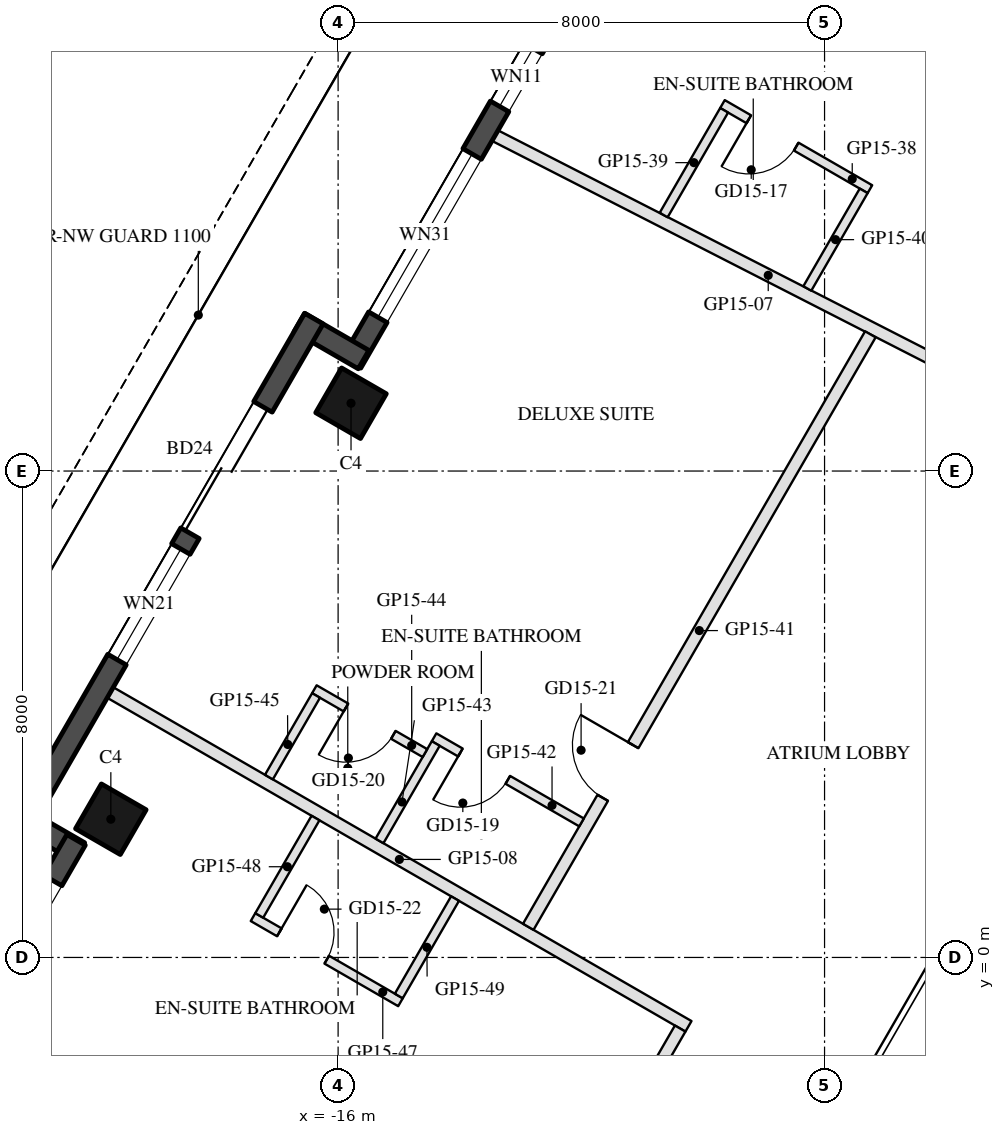
"""IFC4 building model, lengths in metres.
Left out: names, types, materials, properties, quantities, classifications, styles, units other than length and angle.
Written with IfcOpenShell. Run it as: python <this file> out.ifc"""

import sys

from ifc_helpers import new_model, si_unit, direction, frame, frame_2d, origin, origin_2d, place, context, subcontext, project, spatial, rectangle, hollow_rectangle, extrude, element, fill, save


model = new_model("IFC4")
c1 = context("Model", 3, precision=1e-05, world=origin(), true_north=direction((0.0, 1.0)))
c2 = subcontext(c1, "Body", "Model", "MODEL_VIEW")
j1 = project(units=[si_unit("LENGTHUNIT", "METRE"), si_unit("PLANEANGLEUNIT", "RADIAN")], contexts=[c1])
p1 = place(None, origin())
s1 = spatial("IfcSite", under=j1, at=p1, CompositionType="ELEMENT")
p2 = place(p1, origin())
s2 = spatial("IfcBuilding", under=s1, at=p2, CompositionType="ELEMENT")
p3 = place(p2, frame((0.0, 0.0, 172.5)))
s3 = spatial("IfcBuildingStorey", under=s2, at=p3, CompositionType="ELEMENT", Elevation=172.5)
for number, where, z_axis, x_axis in (
    (1, (-15.788, 9.115, 0.0), (0.0, 0.0, 1.0), (0.5, 0.866, 0.0)),
    (2, (-19.738, 2.273, 0.0), (0.0, 0.0, 1.0), (0.5, 0.866, 0.0)),
):
    element("IfcColumn", number, at=place(p3, frame(where, z_axis=z_axis, x_axis=x_axis)), inside=s3, PredefinedType="COLUMN", context=c2, shape_type="SweptSolid", body=[
        extrude(hollow_rectangle(XDim=0.85, YDim=0.85, WallThickness=0.04, at=origin_2d()), origin(), (0.0, 0.0, 1.0), 3.7),
    ])
p4 = place(p3, frame((-12.409, 15.617, 0.0), z_axis=(0.0, 0.0, 1.0), x_axis=(-0.500003597184, -0.866023326939, 0.0)))
e3 = element("IfcWall", 3, at=p4, inside=s3, PredefinedType="SOLIDWALL", context=c2, shape_type="SweptSolid", body=[
    extrude(rectangle(XDim=6.74, YDim=0.35, at=frame_2d((3.37, 0.0))), origin(), (0.0, 0.0, 1.0), 3.55),
])
p5 = place(p4, frame((0.77, 0.0, 0.3)))
e4 = element("IfcOpeningElement", 4, at=p5, cuts=e3, PredefinedType="OPENING", context=c2, shape_type="SweptSolid", body=[
    extrude(rectangle(XDim=1.1, YDim=2.65, at=frame_2d((0.55, 1.325))), frame((0.0, 0.185, 0.0), z_axis=(0.0, -1.0, 0.0), x_axis=(1.0, 0.0, 0.0)), (0.0, 0.0, 1.0), 0.37),
])
p6 = place(p4, frame((2.774, 0.0, 0.3)))
e5 = element("IfcOpeningElement", 5, at=p6, cuts=e3, PredefinedType="OPENING", context=c2, shape_type="SweptSolid", body=[
    extrude(rectangle(XDim=3.1, YDim=2.65, at=frame_2d((1.55, 1.325))), frame((0.0, 0.185, 0.0), z_axis=(0.0, -1.0, 0.0), x_axis=(1.0, 0.0, 0.0)), (0.0, 0.0, 1.0), 0.37),
])
p7 = place(p3, frame((-15.581, 9.833, 0.0), z_axis=(0.0, 0.0, 1.0), x_axis=(-0.866055662726, 0.499947586314, 0.0)))
e6 = element("IfcWall", 6, at=p7, inside=s3, PredefinedType="SOLIDWALL", context=c2, shape_type="SweptSolid", body=[
    extrude(rectangle(XDim=1.22, YDim=0.35, at=frame_2d((0.61, 0.0))), origin(), (0.0, 0.0, 1.0), 3.55),
])
p8 = place(p3, frame((-16.398, 10.507, 0.0), z_axis=(0.0, 0.0, 1.0), x_axis=(-0.499999142773, -0.866025898704, 0.0)))
e7 = element("IfcWall", 7, at=p8, inside=s3, PredefinedType="SOLIDWALL", context=c2, shape_type="SweptSolid", body=[
    extrude(rectangle(XDim=9.7, YDim=0.35, at=frame_2d((4.85, 0.0))), origin(), (0.0, 0.0, 1.0), 3.55),
])
p9 = place(p8, frame((1.675, 0.0, 0.0)))
e8 = element("IfcOpeningElement", 8, at=p9, cuts=e7, PredefinedType="OPENING", context=c2, shape_type="SweptSolid", body=[
    extrude(rectangle(XDim=2.4, YDim=2.4, at=frame_2d((1.2, 1.2))), frame((0.0, 0.185, 0.0), z_axis=(0.0, -1.0, 0.0), x_axis=(1.0, 0.0, 0.0)), (0.0, 0.0, 1.0), 0.37),
])
p10 = place(p8, frame((4.375, 0.0, 0.3)))
e9 = element("IfcOpeningElement", 9, at=p10, cuts=e7, PredefinedType="OPENING", context=c2, shape_type="SweptSolid", body=[
    extrude(rectangle(XDim=2.1, YDim=2.65, at=frame_2d((1.05, 1.325))), frame((0.0, 0.185, 0.0), z_axis=(0.0, -1.0, 0.0), x_axis=(1.0, 0.0, 0.0)), (0.0, 0.0, 1.0), 0.37),
])
p11 = place(p3, frame((-21.312, 2.346, 0.0), z_axis=(0.0, 0.0, 1.0), x_axis=(0.866005645448, -0.500034220881, 0.0)))
e10 = element("IfcWall", 10, at=p11, inside=s3, PredefinedType="SOLIDWALL", context=c2, shape_type="SweptSolid", body=[
    extrude(rectangle(XDim=1.22, YDim=0.35, at=frame_2d((0.61, 0.0))), origin(), (0.0, 0.0, 1.0), 3.55),
])
p12 = place(p3, frame((-20.309, 1.934, 0.0), z_axis=(0.0, 0.0, 1.0), x_axis=(-0.499992114976, -0.866029956157, 0.0)))
e11 = element("IfcWall", 11, at=p12, inside=s3, PredefinedType="SOLIDWALL", context=c2, shape_type="SweptSolid", body=[
    extrude(rectangle(XDim=6.74, YDim=0.35, at=frame_2d((3.37, 0.0))), origin(), (0.0, 0.0, 1.0), 3.55),
])
p13 = place(p12, frame((4.02, 0.0, 0.0)))
e12 = element("IfcOpeningElement", 12, at=p13, cuts=e11, PredefinedType="OPENING", context=c2, shape_type="SweptSolid", body=[
    extrude(rectangle(XDim=2.4, YDim=2.4, at=frame_2d((1.2, 1.2))), frame((0.0, 0.185, 0.0), z_axis=(0.0, -1.0, 0.0), x_axis=(1.0, 0.0, 0.0)), (0.0, 0.0, 1.0), 0.37),
])
p14 = place(p12, frame((0.77, 0.0, 0.3)))
e13 = element("IfcOpeningElement", 13, at=p14, cuts=e11, PredefinedType="OPENING", context=c2, shape_type="SweptSolid", body=[
    extrude(rectangle(XDim=2.9, YDim=2.65, at=frame_2d((1.45, 1.325))), frame((0.0, 0.185, 0.0), z_axis=(0.0, -1.0, 0.0), x_axis=(1.0, 0.0, 0.0)), (0.0, 0.0, 1.0), 0.37),
])
p15 = place(p3, frame((-13.42, 13.517, 0.0), z_axis=(0.0, 0.0, 1.0), x_axis=(0.890385665103, -0.455206950056, 0.0)))
e14 = element("IfcWall", 14, at=p15, inside=s3, PredefinedType="PARTITIONING", context=c2, shape_type="SweptSolid", body=[
    extrude(rectangle(XDim=10.093, YDim=0.2, at=frame_2d((5.047, 0.0))), origin(), (0.0, 0.0, 1.0), 3.06),
])
p16 = place(p3, frame((-19.747, 4.357, 0.0), z_axis=(0.0, 0.0, 1.0), x_axis=(0.866027479907, -0.499996404033, 0.0)))
e15 = element("IfcWall", 15, at=p16, inside=s3, PredefinedType="PARTITIONING", context=c2, shape_type="SweptSolid", body=[
    extrude(rectangle(XDim=10.98, YDim=0.2, at=frame_2d((5.49, 0.0))), origin(), (0.0, 0.0, 1.0), 3.06),
])
p17 = place(p3, frame((-7.254, 12.636, 0.0), z_axis=(0.0, 0.0, 1.0), x_axis=(-0.865996816683, 0.500049511043, 0.0)))
e16 = element("IfcWall", 16, at=p17, inside=s3, PredefinedType="PARTITIONING", context=c2, shape_type="SweptSolid", body=[
    extrude(rectangle(XDim=2.8, YDim=0.15, at=frame_2d((1.4, 0.0))), origin(), (0.0, 0.0, 1.0), 3.55),
])
p18 = place(p17, frame((1.4, 0.0, 0.0)))
e17 = element("IfcOpeningElement", 17, at=p18, cuts=e16, PredefinedType="OPENING", context=c2, shape_type="SweptSolid", body=[
    extrude(rectangle(XDim=0.9, YDim=2.1, at=frame_2d((0.45, 1.05))), frame((0.0, 0.085, 0.0), z_axis=(0.0, -1.0, 0.0), x_axis=(1.0, 0.0, 0.0)), (0.0, 0.0, 1.0), 0.17),
])
p19 = place(p3, frame((-9.651, 13.933, 0.0), z_axis=(0.0, 0.0, 1.0), x_axis=(-0.50001992892, -0.866013897511, 0.0)))
e18 = element("IfcWall", 18, at=p19, inside=s3, PredefinedType="PARTITIONING", context=c2, shape_type="SweptSolid", body=[
    extrude(rectangle(XDim=1.989, YDim=0.15, at=frame_2d((0.995, 0.0))), origin(), (0.0, 0.0, 1.0), 3.55),
])
p20 = place(p3, frame((-7.356, 12.608, 0.0), z_axis=(0.0, 0.0, 1.0), x_axis=(-0.499935264145, -0.866062775822, 0.0)))
e19 = element("IfcWall", 19, at=p20, inside=s3, PredefinedType="PARTITIONING", context=c2, shape_type="SweptSolid", body=[
    extrude(rectangle(XDim=1.854, YDim=0.15, at=frame_2d((0.927, 0.0))), origin(), (0.0, 0.0, 1.0), 3.55),
])
p21 = place(p3, frame((-12.873, 0.504, 0.0), z_axis=(0.0, 0.0, 1.0), x_axis=(0.500019832059, 0.866013953437, 0.0)))
e20 = element("IfcWall", 20, at=p21, inside=s3, PredefinedType="PARTITIONING", context=c2, shape_type="SweptSolid", body=[
    extrude(rectangle(XDim=11.252, YDim=0.2, at=frame_2d((5.626, 0.0))), origin(), (0.0, 0.0, 1.0), 2.95),
])
p22 = place(p21, frame((2.45, 0.0, 0.0)))
e21 = element("IfcOpeningElement", 21, at=p22, cuts=e20, PredefinedType="OPENING", context=c2, shape_type="SweptSolid", body=[
    extrude(rectangle(XDim=1.0, YDim=2.1, at=frame_2d((0.5, 1.05))), frame((0.0, 0.11, 0.0), z_axis=(0.0, -1.0, 0.0), x_axis=(1.0, 0.0, 0.0)), (0.0, 0.0, 1.0), 0.22),
])
p23 = place(p3, frame((-11.997, 2.221, 0.0), z_axis=(0.0, 0.0, 1.0), x_axis=(-0.866034573852, 0.49998411664, 0.0)))
e22 = element("IfcWall", 22, at=p23, inside=s3, PredefinedType="PARTITIONING", context=c2, shape_type="SweptSolid", body=[
    extrude(rectangle(XDim=2.8, YDim=0.15, at=frame_2d((1.4, 0.0))), origin(), (0.0, 0.0, 1.0), 2.95),
])
p24 = place(p23, frame((1.4, 0.0, 0.0)))
e23 = element("IfcOpeningElement", 23, at=p24, cuts=e22, PredefinedType="OPENING", context=c2, shape_type="SweptSolid", body=[
    extrude(rectangle(XDim=0.9, YDim=2.1, at=frame_2d((0.45, 1.05))), frame((0.0, 0.085, 0.0), z_axis=(0.0, -1.0, 0.0), x_axis=(1.0, 0.0, 0.0)), (0.0, 0.0, 1.0), 0.17),
])
p25 = place(p3, frame((-14.394, 3.519, 0.0), z_axis=(0.0, 0.0, 1.0), x_axis=(-0.499886193382, -0.866091100096, 0.0)))
e24 = element("IfcWall", 24, at=p25, inside=s3, PredefinedType="PARTITIONING", context=c2, shape_type="SweptSolid", body=[
    extrude(rectangle(XDim=1.85, YDim=0.15, at=frame_2d((0.925, 0.0))), origin(), (0.0, 0.0, 1.0), 3.55),
])
p26 = place(p3, frame((-14.572, 3.361, 0.0), z_axis=(0.0, 0.0, 1.0), x_axis=(-0.866009402589, 0.500027713859, 0.0)))
e25 = element("IfcWall", 25, at=p26, inside=s3, PredefinedType="PARTITIONING", context=c2, shape_type="SweptSolid", body=[
    extrude(rectangle(XDim=2.1, YDim=0.15, at=frame_2d((1.05, 0.0))), origin(), (0.0, 0.0, 1.0), 3.55),
])
p27 = place(p26, frame((0.6, 0.0, 0.0)))
e26 = element("IfcOpeningElement", 26, at=p27, cuts=e25, PredefinedType="OPENING", context=c2, shape_type="SweptSolid", body=[
    extrude(rectangle(XDim=0.9, YDim=2.1, at=frame_2d((0.45, 1.05))), frame((0.0, 0.085, 0.0), z_axis=(0.0, -1.0, 0.0), x_axis=(1.0, 0.0, 0.0)), (0.0, 0.0, 1.0), 0.17),
])
p28 = place(p3, frame((-16.363, 4.309, 0.0), z_axis=(0.0, 0.0, 1.0), x_axis=(-0.500086022567, -0.865975732936, 0.0)))
e27 = element("IfcWall", 27, at=p28, inside=s3, PredefinedType="PARTITIONING", context=c2, shape_type="SweptSolid", body=[
    extrude(rectangle(XDim=1.55, YDim=0.15, at=frame_2d((0.775, 0.0))), origin(), (0.0, 0.0, 1.0), 3.55),
])
p29 = place(p3, frame((-12.269, -4.45, 0.0), z_axis=(0.0, 0.0, 1.0), x_axis=(0.500055316652, 0.865993464345, 0.0)))
e28 = element("IfcWall", 28, at=p29, inside=s3, PredefinedType="PARTITIONING", context=c2, shape_type="SweptSolid", body=[
    extrude(rectangle(XDim=3.788, YDim=0.2, at=frame_2d((1.894, 0.0))), origin(), (0.0, 0.0, 1.0), 2.95),
])
p30 = place(p29, frame((1.394, 0.0, 0.0)))
e29 = element("IfcOpeningElement", 29, at=p30, cuts=e28, PredefinedType="OPENING", context=c2, shape_type="SweptSolid", body=[
    extrude(rectangle(XDim=1.0, YDim=2.1, at=frame_2d((0.5, 1.05))), frame((0.0, 0.11, 0.0), z_axis=(0.0, -1.0, 0.0), x_axis=(1.0, 0.0, 0.0)), (0.0, 0.0, 1.0), 0.22),
])
p31 = place(p3, frame((-17.399, 0.664, 0.0), z_axis=(0.0, 0.0, 1.0), x_axis=(0.866018616679, -0.500011755427, 0.0)))
e30 = element("IfcWall", 30, at=p31, inside=s3, PredefinedType="PARTITIONING", context=c2, shape_type="SweptSolid", body=[
    extrude(rectangle(XDim=2.8, YDim=0.15, at=frame_2d((1.4, 0.0))), origin(), (0.0, 0.0, 1.0), 3.55),
])
p32 = place(p31, frame((0.5, 0.0, 0.0)))
e31 = element("IfcOpeningElement", 31, at=p32, cuts=e30, PredefinedType="OPENING", context=c2, shape_type="SweptSolid", body=[
    extrude(rectangle(XDim=0.9, YDim=2.1, at=frame_2d((0.45, 1.05))), frame((0.0, 0.085, 0.0), z_axis=(0.0, -1.0, 0.0), x_axis=(1.0, 0.0, 0.0)), (0.0, 0.0, 1.0), 0.17),
])
p33 = place(p3, frame((-16.372, 2.293, 0.0), z_axis=(0.0, 0.0, 1.0), x_axis=(-0.499985172903, -0.866033964044, 0.0)))
e32 = element("IfcWall", 32, at=p33, inside=s3, PredefinedType="PARTITIONING", context=c2, shape_type="SweptSolid", body=[
    extrude(rectangle(XDim=1.85, YDim=0.15, at=frame_2d((0.925, 0.0))), origin(), (0.0, 0.0, 1.0), 2.95),
])
p34 = place(p3, frame((-14.077, 0.968, 0.0), z_axis=(0.0, 0.0, 1.0), x_axis=(-0.500042316284, -0.866000971088, 0.0)))
e33 = element("IfcWall", 33, at=p34, inside=s3, PredefinedType="PARTITIONING", context=c2, shape_type="SweptSolid", body=[
    extrude(rectangle(XDim=1.85, YDim=0.15, at=frame_2d((0.925, 0.0))), origin(), (0.0, 0.0, 1.0), 2.95),
])
p35 = place(p5, origin())
e34 = element("IfcWindow", 34, at=p35, inside=s3, PartitioningType="SINGLE_PANEL", PredefinedType="WINDOW", context=c2, shape_type="SweptSolid", body=[
    extrude(rectangle(XDim=1.1, YDim=2.65, at=frame_2d((0.55, 1.325))), frame((0.0, 0.03, 0.0), z_axis=(0.0, -1.0, 0.0), x_axis=(1.0, 0.0, 0.0)), (0.0, 0.0, 1.0), 0.06),
])
fill(e4, e34)
p36 = place(p6, origin())
e35 = element("IfcWindow", 35, at=p36, inside=s3, PartitioningType="SINGLE_PANEL", PredefinedType="WINDOW", context=c2, shape_type="SweptSolid", body=[
    extrude(rectangle(XDim=3.1, YDim=2.65, at=frame_2d((1.55, 1.325))), frame((0.0, 0.03, 0.0), z_axis=(0.0, -1.0, 0.0), x_axis=(1.0, 0.0, 0.0)), (0.0, 0.0, 1.0), 0.06),
])
fill(e5, e35)
p37 = place(p9, frame((2.4, 0.0, 0.0), z_axis=(0.0, 0.0, 1.0), x_axis=(-1.0, 0.0, 0.0)))
e36 = element("IfcDoor", 36, at=p37, inside=s3, OperationType="SLIDING_TO_LEFT", PredefinedType="DOOR", context=c2, shape_type="SweptSolid", body=[
    extrude(rectangle(XDim=2.4, YDim=2.4, at=frame_2d((1.2, 1.2))), frame((0.0, 0.025, 0.0), z_axis=(0.0, -1.0, 0.0), x_axis=(1.0, 0.0, 0.0)), (0.0, 0.0, 1.0), 0.05),
])
fill(e8, e36)
p38 = place(p10, origin())
e37 = element("IfcWindow", 37, at=p38, inside=s3, PartitioningType="SINGLE_PANEL", PredefinedType="WINDOW", context=c2, shape_type="SweptSolid", body=[
    extrude(rectangle(XDim=2.1, YDim=2.65, at=frame_2d((1.05, 1.325))), frame((0.0, 0.03, 0.0), z_axis=(0.0, -1.0, 0.0), x_axis=(1.0, 0.0, 0.0)), (0.0, 0.0, 1.0), 0.06),
])
fill(e9, e37)
p39 = place(p14, origin())
e38 = element("IfcWindow", 38, at=p39, inside=s3, PartitioningType="SINGLE_PANEL", PredefinedType="WINDOW", context=c2, shape_type="SweptSolid", body=[
    extrude(rectangle(XDim=2.9, YDim=2.65, at=frame_2d((1.45, 1.325))), frame((0.0, 0.03, 0.0), z_axis=(0.0, -1.0, 0.0), x_axis=(1.0, 0.0, 0.0)), (0.0, 0.0, 1.0), 0.06),
])
fill(e13, e38)
p40 = place(p18, origin())
e39 = element("IfcDoor", 39, at=p40, inside=s3, OperationType="SINGLE_SWING_RIGHT", PredefinedType="DOOR", context=c2, shape_type="SweptSolid", body=[
    extrude(rectangle(XDim=0.9, YDim=2.1, at=frame_2d((0.45, 1.05))), frame((0.0, 0.025, 0.0), z_axis=(0.0, -1.0, 0.0), x_axis=(1.0, 0.0, 0.0)), (0.0, 0.0, 1.0), 0.05),
])
fill(e17, e39)
p41 = place(p24, origin())
e40 = element("IfcDoor", 40, at=p41, inside=s3, OperationType="SINGLE_SWING_RIGHT", PredefinedType="DOOR", context=c2, shape_type="SweptSolid", body=[
    extrude(rectangle(XDim=0.9, YDim=2.1, at=frame_2d((0.45, 1.05))), frame((0.0, 0.025, 0.0), z_axis=(0.0, -1.0, 0.0), x_axis=(1.0, 0.0, 0.0)), (0.0, 0.0, 1.0), 0.05),
])
fill(e23, e40)
p42 = place(p27, origin())
e41 = element("IfcDoor", 41, at=p42, inside=s3, OperationType="SINGLE_SWING_RIGHT", PredefinedType="DOOR", context=c2, shape_type="SweptSolid", body=[
    extrude(rectangle(XDim=0.9, YDim=2.1, at=frame_2d((0.45, 1.05))), frame((0.0, 0.025, 0.0), z_axis=(0.0, -1.0, 0.0), x_axis=(1.0, 0.0, 0.0)), (0.0, 0.0, 1.0), 0.05),
])
fill(e26, e41)
p43 = place(p22, origin())
e42 = element("IfcDoor", 42, at=p43, inside=s3, OperationType="SINGLE_SWING_RIGHT", PredefinedType="DOOR", context=c2, shape_type="SweptSolid", body=[
    extrude(rectangle(XDim=1.0, YDim=2.1, at=frame_2d((0.5, 1.05))), frame((0.0, 0.025, 0.0), z_axis=(0.0, -1.0, 0.0), x_axis=(1.0, 0.0, 0.0)), (0.0, 0.0, 1.0), 0.05),
])
fill(e21, e42)
p44 = place(p32, origin())
e43 = element("IfcDoor", 43, at=p44, inside=s3, OperationType="SINGLE_SWING_LEFT", PredefinedType="DOOR", context=c2, shape_type="SweptSolid", body=[
    extrude(rectangle(XDim=0.9, YDim=2.1, at=frame_2d((0.45, 1.05))), frame((0.0, 0.025, 0.0), z_axis=(0.0, -1.0, 0.0), x_axis=(1.0, 0.0, 0.0)), (0.0, 0.0, 1.0), 0.05),
])
fill(e31, e43)
save(model, sys.argv[1])
